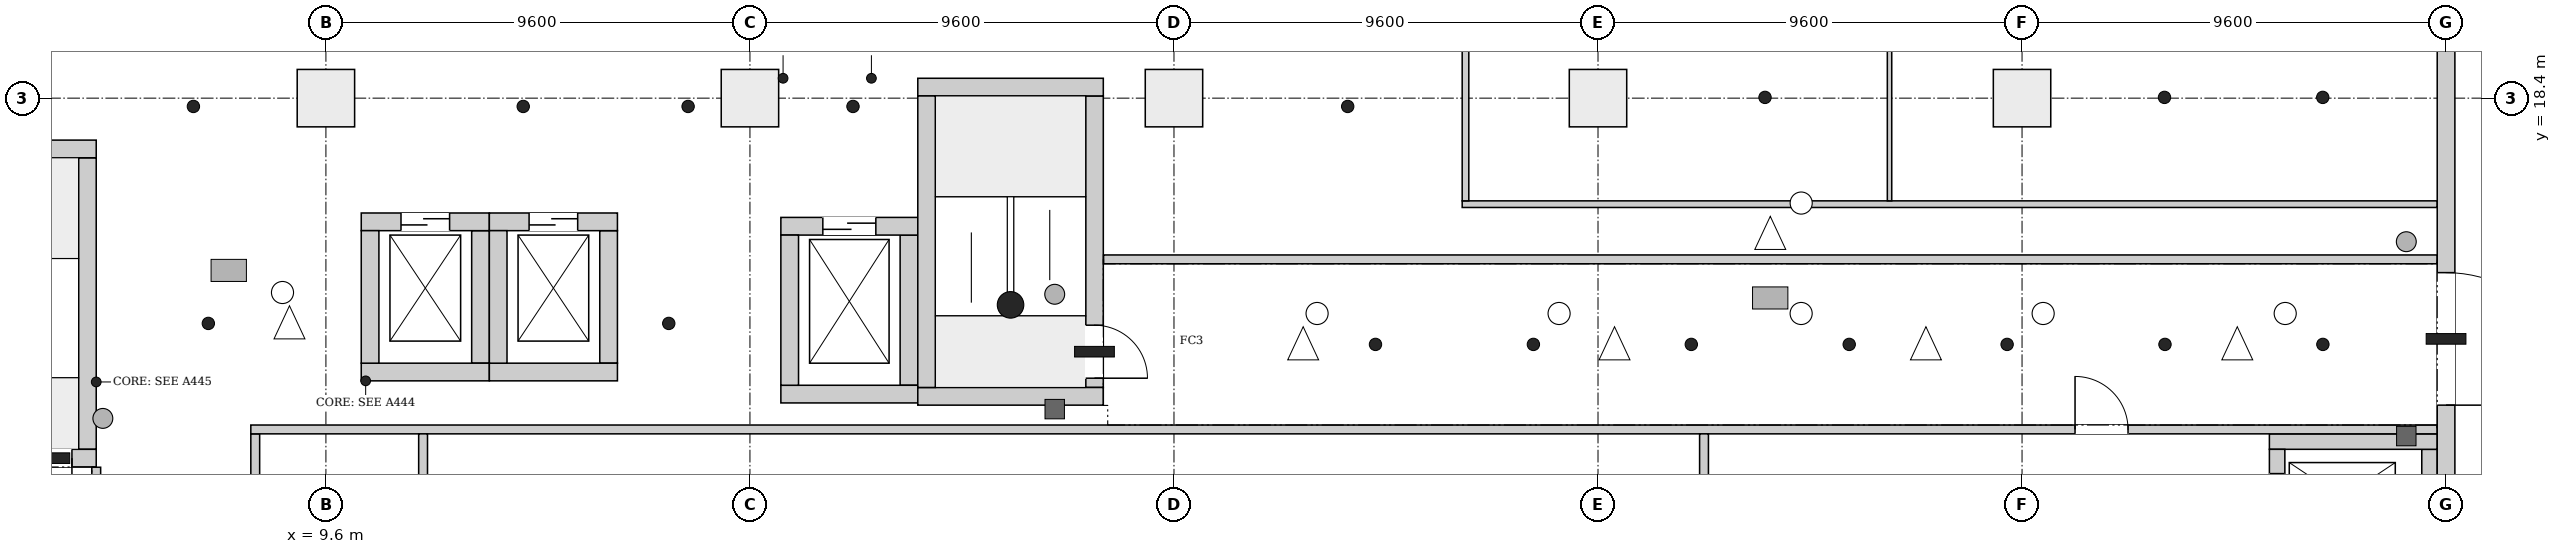
"""IFC4 building model, lengths in metres.
Left out: names, types, materials, properties, quantities, classifications, styles, units other than length and angle.
Written with IfcOpenShell. Run it as: python <this file> out.ifc"""

import sys

from ifc_helpers import new_model, si_unit, direction, frame, frame_2d, origin, origin_2d, place, context, subcontext, project, spatial, rectangle, extrude, element, fill, save


model = new_model("IFC4")
c1 = context("Model", 3, precision=1e-05, world=origin(), true_north=direction((0.0, 1.0)))
c2 = subcontext(c1, "Body", "Model", "MODEL_VIEW")
j1 = project(units=[si_unit("LENGTHUNIT", "METRE"), si_unit("PLANEANGLEUNIT", "RADIAN")], contexts=[c1])
p1 = place(None, origin())
s1 = spatial("IfcSite", under=j1, at=p1, CompositionType="ELEMENT")
p2 = place(p1, origin())
s2 = spatial("IfcBuilding", under=s1, at=p2, CompositionType="ELEMENT")
p3 = place(p2, origin())
s3 = spatial("IfcBuildingStorey", under=s2, at=p3, CompositionType="ELEMENT", Elevation=0.0)
p4 = place(p3, frame((57.6, -0.2, 0.0), z_axis=(0.0, 0.0, 1.0), x_axis=(0.0, 1.0, 0.0)))
e1 = element("IfcWall", 1, at=p4, inside=s3, PredefinedType="SHEAR", context=c2, shape_type="SweptSolid", body=[
    extrude(rectangle(XDim=46.88, YDim=0.4, at=frame_2d((23.44, 0.0))), origin(), (0.0, 0.0, 1.0), 6.5),
])
p5 = place(p4, frame((11.65, 0.0, 0.0)))
e2 = element("IfcOpeningElement", 2, at=p5, cuts=e1, PredefinedType="OPENING", context=c2, shape_type="SweptSolid", body=[
    extrude(rectangle(XDim=3.0, YDim=2.4, at=frame_2d((1.5, 1.2))), frame((0.0, 0.21, 0.0), z_axis=(0.0, -1.0, 0.0), x_axis=(1.0, 0.0, 0.0)), (0.0, 0.0, 1.0), 0.42),
])
p6 = place(p4, frame((38.2, 0.0, 0.0)))
e3 = element("IfcOpeningElement", 3, at=p6, cuts=e1, PredefinedType="OPENING", context=c2, shape_type="SweptSolid", body=[
    extrude(rectangle(XDim=3.0, YDim=2.4, at=frame_2d((1.5, 1.2))), frame((0.0, 0.21, 0.0), z_axis=(0.0, -1.0, 0.0), x_axis=(1.0, 0.0, 0.0)), (0.0, 0.0, 1.0), 0.42),
])
p7 = place(p3, frame((0.2, 10.25, 0.0), z_axis=(0.0, 0.0, 1.0), x_axis=(1.0, 0.0, 0.0)))
e4 = element("IfcWall", 4, at=p7, inside=s3, PredefinedType="SHEAR", context=c2, shape_type="SweptSolid", body=[
    extrude(rectangle(XDim=4.2, YDim=0.4, at=frame_2d((2.1, 0.0))), origin(), (0.0, 0.0, 1.0), 6.5),
])
p8 = place(p7, frame((0.55, 0.0, 0.0)))
e5 = element("IfcOpeningElement", 5, at=p8, cuts=e4, PredefinedType="OPENING", context=c2, shape_type="SweptSolid", body=[
    extrude(rectangle(XDim=1.0, YDim=2.1, at=frame_2d((0.5, 1.05))), frame((0.0, 0.21, 0.0), z_axis=(0.0, -1.0, 0.0), x_axis=(1.0, 0.0, 0.0)), (0.0, 0.0, 1.0), 0.42),
])
p9 = place(p7, frame((2.65, 0.0, 0.0)))
e6 = element("IfcOpeningElement", 6, at=p9, cuts=e4, PredefinedType="OPENING", context=c2, shape_type="SweptSolid", body=[
    extrude(rectangle(XDim=1.0, YDim=2.1, at=frame_2d((0.5, 1.05))), frame((0.0, 0.21, 0.0), z_axis=(0.0, -1.0, 0.0), x_axis=(1.0, 0.0, 0.0)), (0.0, 0.0, 1.0), 0.42),
])
p10 = place(p3, frame((0.2, 17.25, 0.0), z_axis=(0.0, 0.0, 1.0), x_axis=(1.0, 0.0, 0.0)))
e7 = element("IfcWall", 7, at=p10, inside=s3, PredefinedType="SHEAR", context=c2, shape_type="SweptSolid", body=[
    extrude(rectangle(XDim=4.2, YDim=0.4, at=frame_2d((2.1, 0.0))), origin(), (0.0, 0.0, 1.0), 6.5),
])
p11 = place(p3, frame((4.2, 10.45, 0.0), z_axis=(0.0, 0.0, 1.0), x_axis=(0.0, 1.0, 0.0)))
e8 = element("IfcWall", 8, at=p11, inside=s3, PredefinedType="SHEAR", context=c2, shape_type="SweptSolid", body=[
    extrude(rectangle(XDim=6.6, YDim=0.4, at=frame_2d((3.3, 0.0))), origin(), (0.0, 0.0, 1.0), 6.5),
])
for number, where, z_axis, x_axis in (
    (9, (23.0, 11.65, 0.0), (0.0, 0.0, 1.0), (1.0, 0.0, 0.0)),
    (10, (23.0, 18.65, 0.0), (0.0, 0.0, 1.0), (1.0, 0.0, 0.0)),
):
    element("IfcWall", number, at=place(p3, frame(where, z_axis=z_axis, x_axis=x_axis)), inside=s3, PredefinedType="SHEAR", context=c2, shape_type="SweptSolid", body=[
        extrude(rectangle(XDim=4.2, YDim=0.4, at=frame_2d((2.1, 0.0))), origin(), (0.0, 0.0, 1.0), 6.5),
    ])
p12 = place(p3, frame((23.2, 11.85, 0.0), z_axis=(0.0, 0.0, 1.0), x_axis=(0.0, 1.0, 0.0)))
e11 = element("IfcWall", 11, at=p12, inside=s3, PredefinedType="SHEAR", context=c2, shape_type="SweptSolid", body=[
    extrude(rectangle(XDim=6.6, YDim=0.4, at=frame_2d((3.3, 0.0))), origin(), (0.0, 0.0, 1.0), 6.5),
])
p13 = place(p3, frame((27.0, 11.85, 0.0), z_axis=(0.0, 0.0, 1.0), x_axis=(0.0, 1.0, 0.0)))
e12 = element("IfcWall", 12, at=p13, inside=s3, PredefinedType="SHEAR", context=c2, shape_type="SweptSolid", body=[
    extrude(rectangle(XDim=6.6, YDim=0.4, at=frame_2d((3.3, 0.0))), origin(), (0.0, 0.0, 1.0), 6.5),
])
p14 = place(p13, frame((0.21, 0.0, 0.0)))
e13 = element("IfcOpeningElement", 13, at=p14, cuts=e12, PredefinedType="OPENING", context=c2, shape_type="SweptSolid", body=[
    extrude(rectangle(XDim=1.2, YDim=2.1, at=frame_2d((0.6, 1.05))), frame((0.0, 0.21, 0.0), z_axis=(0.0, -1.0, 0.0), x_axis=(1.0, 0.0, 0.0)), (0.0, 0.0, 1.0), 0.42),
])
p15 = place(p3, frame((53.6, 10.625, 0.0), z_axis=(0.0, 0.0, 1.0), x_axis=(1.0, 0.0, 0.0)))
e14 = element("IfcWall", 14, at=p15, inside=s3, PredefinedType="SHEAR", context=c2, shape_type="SweptSolid", body=[
    extrude(rectangle(XDim=3.8, YDim=0.35, at=frame_2d((1.9, 0.0))), origin(), (0.0, 0.0, 1.0), 6.5),
])
p16 = place(p3, frame((53.775, 8.25, 0.0), z_axis=(0.0, 0.0, 1.0), x_axis=(0.0, 1.0, 0.0)))
e15 = element("IfcWall", 15, at=p16, inside=s3, PredefinedType="SHEAR", context=c2, shape_type="SweptSolid", body=[
    extrude(rectangle(XDim=2.2, YDim=0.35, at=frame_2d((1.1, 0.0))), origin(), (0.0, 0.0, 1.0), 6.5),
])
p17 = place(p16, frame((0.55, 0.0, 0.0)))
e16 = element("IfcOpeningElement", 16, at=p17, cuts=e15, PredefinedType="OPENING", context=c2, shape_type="SweptSolid", body=[
    extrude(rectangle(XDim=1.1, YDim=2.1, at=frame_2d((0.55, 1.05))), frame((0.0, 0.185, 0.0), z_axis=(0.0, -1.0, 0.0), x_axis=(1.0, 0.0, 0.0)), (0.0, 0.0, 1.0), 0.37),
])
p18 = place(p3, frame((57.225, 8.25, 0.0), z_axis=(0.0, 0.0, 1.0), x_axis=(0.0, 1.0, 0.0)))
e17 = element("IfcWall", 17, at=p18, inside=s3, PredefinedType="SHEAR", context=c2, shape_type="SweptSolid", body=[
    extrude(rectangle(XDim=2.2, YDim=0.35, at=frame_2d((1.1, 0.0))), origin(), (0.0, 0.0, 1.0), 6.5),
])
p19 = place(p3, frame((10.4, 12.2, 0.0), z_axis=(0.0, 0.0, 1.0), x_axis=(1.0, 0.0, 0.0)))
e18 = element("IfcWall", 18, at=p19, inside=s3, PredefinedType="SHEAR", context=c2, shape_type="SweptSolid", body=[
    extrude(rectangle(XDim=2.9, YDim=0.4, at=frame_2d((1.45, 0.0))), origin(), (0.0, 0.0, 1.0), 6.5),
])
p20 = place(p3, frame((10.4, 15.6, 0.0), z_axis=(0.0, 0.0, 1.0), x_axis=(1.0, 0.0, 0.0)))
e19 = element("IfcWall", 19, at=p20, inside=s3, PredefinedType="SHEAR", context=c2, shape_type="SweptSolid", body=[
    extrude(rectangle(XDim=2.9, YDim=0.4, at=frame_2d((1.45, 0.0))), origin(), (0.0, 0.0, 1.0), 6.5),
])
p21 = place(p20, frame((0.9, 0.0, 0.0)))
e20 = element("IfcOpeningElement", 20, at=p21, cuts=e19, PredefinedType="OPENING", context=c2, shape_type="SweptSolid", body=[
    extrude(rectangle(XDim=1.1, YDim=2.1, at=frame_2d((0.55, 1.05))), frame((0.0, 0.21, 0.0), z_axis=(0.0, -1.0, 0.0), x_axis=(1.0, 0.0, 0.0)), (0.0, 0.0, 1.0), 0.42),
])
for number, where, z_axis, x_axis in (
    (21, (10.6, 12.4, 0.0), (0.0, 0.0, 1.0), (0.0, 1.0, 0.0)),
    (22, (13.1, 12.4, 0.0), (0.0, 0.0, 1.0), (0.0, 1.0, 0.0)),
):
    element("IfcWall", number, at=place(p3, frame(where, z_axis=z_axis, x_axis=x_axis)), inside=s3, PredefinedType="SHEAR", context=c2, shape_type="SweptSolid", body=[
        extrude(rectangle(XDim=3.0, YDim=0.4, at=frame_2d((1.5, 0.0))), origin(), (0.0, 0.0, 1.0), 6.5),
    ])
p22 = place(p3, frame((13.3, 12.2, 0.0), z_axis=(0.0, 0.0, 1.0), x_axis=(1.0, 0.0, 0.0)))
e23 = element("IfcWall", 23, at=p22, inside=s3, PredefinedType="SHEAR", context=c2, shape_type="SweptSolid", body=[
    extrude(rectangle(XDim=2.9, YDim=0.4, at=frame_2d((1.45, 0.0))), origin(), (0.0, 0.0, 1.0), 6.5),
])
p23 = place(p3, frame((13.3, 15.6, 0.0), z_axis=(0.0, 0.0, 1.0), x_axis=(1.0, 0.0, 0.0)))
e24 = element("IfcWall", 24, at=p23, inside=s3, PredefinedType="SHEAR", context=c2, shape_type="SweptSolid", body=[
    extrude(rectangle(XDim=2.9, YDim=0.4, at=frame_2d((1.45, 0.0))), origin(), (0.0, 0.0, 1.0), 6.5),
])
p24 = place(p23, frame((0.9, 0.0, 0.0)))
e25 = element("IfcOpeningElement", 25, at=p24, cuts=e24, PredefinedType="OPENING", context=c2, shape_type="SweptSolid", body=[
    extrude(rectangle(XDim=1.1, YDim=2.1, at=frame_2d((0.55, 1.05))), frame((0.0, 0.21, 0.0), z_axis=(0.0, -1.0, 0.0), x_axis=(1.0, 0.0, 0.0)), (0.0, 0.0, 1.0), 0.42),
])
for number, where, z_axis, x_axis in (
    (26, (13.5, 12.4, 0.0), (0.0, 0.0, 1.0), (0.0, 1.0, 0.0)),
    (27, (16.0, 12.4, 0.0), (0.0, 0.0, 1.0), (0.0, 1.0, 0.0)),
):
    element("IfcWall", number, at=place(p3, frame(where, z_axis=z_axis, x_axis=x_axis)), inside=s3, PredefinedType="SHEAR", context=c2, shape_type="SweptSolid", body=[
        extrude(rectangle(XDim=3.0, YDim=0.4, at=frame_2d((1.5, 0.0))), origin(), (0.0, 0.0, 1.0), 6.5),
    ])
p25 = place(p3, frame((19.9, 11.7, 0.0), z_axis=(0.0, 0.0, 1.0), x_axis=(1.0, 0.0, 0.0)))
e28 = element("IfcWall", 28, at=p25, inside=s3, PredefinedType="SHEAR", context=c2, shape_type="SweptSolid", body=[
    extrude(rectangle(XDim=3.1, YDim=0.4, at=frame_2d((1.55, 0.0))), origin(), (0.0, 0.0, 1.0), 6.5),
])
p26 = place(p3, frame((19.9, 15.5, 0.0), z_axis=(0.0, 0.0, 1.0), x_axis=(1.0, 0.0, 0.0)))
e29 = element("IfcWall", 29, at=p26, inside=s3, PredefinedType="SHEAR", context=c2, shape_type="SweptSolid", body=[
    extrude(rectangle(XDim=3.1, YDim=0.4, at=frame_2d((1.55, 0.0))), origin(), (0.0, 0.0, 1.0), 6.5),
])
p27 = place(p26, frame((0.95, 0.0, 0.0)))
e30 = element("IfcOpeningElement", 30, at=p27, cuts=e29, PredefinedType="OPENING", context=c2, shape_type="SweptSolid", body=[
    extrude(rectangle(XDim=1.2, YDim=2.1, at=frame_2d((0.6, 1.05))), frame((0.0, 0.21, 0.0), z_axis=(0.0, -1.0, 0.0), x_axis=(1.0, 0.0, 0.0)), (0.0, 0.0, 1.0), 0.42),
])
for number, where, z_axis, x_axis in (
    (31, (20.1, 11.9, 0.0), (0.0, 0.0, 1.0), (0.0, 1.0, 0.0)),
    (32, (22.8, 11.9, 0.0), (0.0, 0.0, 1.0), (0.0, 1.0, 0.0)),
):
    element("IfcWall", number, at=place(p3, frame(where, z_axis=z_axis, x_axis=x_axis)), inside=s3, PredefinedType="SHEAR", context=c2, shape_type="SweptSolid", body=[
        extrude(rectangle(XDim=3.4, YDim=0.4, at=frame_2d((1.7, 0.0))), origin(), (0.0, 0.0, 1.0), 6.5),
    ])
for number, where, z_axis, x_axis in (
    (33, (9.6, 18.4, 0.0), (0.0, 0.0, 1.0), (1.0, 0.0, 0.0)),
    (34, (19.2, 18.4, 0.0), (0.0, 0.0, 1.0), (1.0, 0.0, 0.0)),
    (35, (28.8, 18.4, 0.0), (0.0, 0.0, 1.0), (1.0, 0.0, 0.0)),
    (36, (38.4, 18.4, 0.0), (0.0, 0.0, 1.0), (1.0, 0.0, 0.0)),
    (37, (48.0, 18.4, 0.0), (0.0, 0.0, 1.0), (1.0, 0.0, 0.0)),
):
    element("IfcColumn", number, at=place(p3, frame(where, z_axis=z_axis, x_axis=x_axis)), inside=s3, PredefinedType="COLUMN", context=c2, shape_type="SweptSolid", body=[
        extrude(rectangle(XDim=1.3, YDim=1.3, at=origin_2d()), origin(), (0.0, 0.0, 1.0), 6.5),
    ])
p28 = place(p3, frame((4.4, 6.6, 0.0), z_axis=(0.0, 0.0, 1.0), x_axis=(0.0, 1.0, 0.0)))
e38 = element("IfcWall", 38, at=p28, inside=s3, PredefinedType="PARTITIONING", context=c2, shape_type="SweptSolid", body=[
    extrude(rectangle(XDim=3.444, YDim=0.2, at=frame_2d((1.722, 0.0))), origin(), (0.0, 0.0, 1.0), 6.15),
])
p29 = place(p28, frame((1.222, 0.0, 0.0)))
e39 = element("IfcOpeningElement", 39, at=p29, cuts=e38, PredefinedType="OPENING", context=c2, shape_type="SweptSolid", body=[
    extrude(rectangle(XDim=1.0, YDim=2.1, at=frame_2d((0.5, 1.05))), frame((0.0, 0.11, 0.0), z_axis=(0.0, -1.0, 0.0), x_axis=(1.0, 0.0, 0.0)), (0.0, 0.0, 1.0), 0.22),
])
p30 = place(p3, frame((8.0, 0.206, 0.0), z_axis=(0.0, 0.0, 1.0), x_axis=(0.0, 1.0, 0.0)))
e40 = element("IfcWall", 40, at=p30, inside=s3, PredefinedType="PARTITIONING", context=c2, shape_type="SweptSolid", body=[
    extrude(rectangle(XDim=10.594, YDim=0.2, at=frame_2d((5.297, 0.0))), origin(), (0.0, 0.0, 1.0), 6.15),
])
p31 = place(p30, frame((4.697, 0.0, 0.0)))
e41 = element("IfcOpeningElement", 41, at=p31, cuts=e40, PredefinedType="OPENING", context=c2, shape_type="SweptSolid", body=[
    extrude(rectangle(XDim=1.2, YDim=2.1, at=frame_2d((0.6, 1.05))), frame((0.0, 0.11, 0.0), z_axis=(0.0, -1.0, 0.0), x_axis=(1.0, 0.0, 0.0)), (0.0, 0.0, 1.0), 0.22),
])
p32 = place(p3, frame((7.9, 10.9, 0.0), z_axis=(0.0, 0.0, 1.0), x_axis=(1.0, 0.0, 0.0)))
e42 = element("IfcWall", 42, at=p32, inside=s3, PredefinedType="PARTITIONING", context=c2, shape_type="SweptSolid", body=[
    extrude(rectangle(XDim=49.494, YDim=0.2, at=frame_2d((24.747, 0.0))), origin(), (0.0, 0.0, 1.0), 6.15),
])
p33 = place(p32, frame((41.3, 0.0, 0.0)))
e43 = element("IfcOpeningElement", 43, at=p33, cuts=e42, PredefinedType="OPENING", context=c2, shape_type="SweptSolid", body=[
    extrude(rectangle(XDim=1.2, YDim=2.1, at=frame_2d((0.6, 1.05))), frame((0.0, 0.11, 0.0), z_axis=(0.0, -1.0, 0.0), x_axis=(1.0, 0.0, 0.0)), (0.0, 0.0, 1.0), 0.22),
])
p34 = place(p3, frame((11.8, 0.206, 0.0), z_axis=(0.0, 0.0, 1.0), x_axis=(0.0, 1.0, 0.0)))
e44 = element("IfcWall", 44, at=p34, inside=s3, PredefinedType="PARTITIONING", context=c2, shape_type="SweptSolid", body=[
    extrude(rectangle(XDim=10.594, YDim=0.2, at=frame_2d((5.297, 0.0))), origin(), (0.0, 0.0, 1.0), 6.15),
])
p35 = place(p34, frame((4.397, 0.0, 0.0)))
e45 = element("IfcOpeningElement", 45, at=p35, cuts=e44, PredefinedType="OPENING", context=c2, shape_type="SweptSolid", body=[
    extrude(rectangle(XDim=1.8, YDim=2.1, at=frame_2d((0.9, 1.05))), frame((0.0, 0.11, 0.0), z_axis=(0.0, -1.0, 0.0), x_axis=(1.0, 0.0, 0.0)), (0.0, 0.0, 1.0), 0.22),
])
p36 = place(p3, frame((27.206, 14.75, 0.0), z_axis=(0.0, 0.0, 1.0), x_axis=(1.0, 0.0, 0.0)))
e46 = element("IfcWall", 46, at=p36, inside=s3, PredefinedType="PARTITIONING", context=c2, shape_type="SweptSolid", body=[
    extrude(rectangle(XDim=30.188, YDim=0.2, at=frame_2d((15.094, 0.0))), origin(), (0.0, 0.0, 1.0), 6.15),
])
p37 = place(p3, frame((35.325, 16.0, 0.0), z_axis=(0.0, 0.0, 1.0), x_axis=(1.0, 0.0, 0.0)))
e47 = element("IfcWall", 47, at=p37, inside=s3, PredefinedType="PARTITIONING", context=c2, shape_type="SweptSolid", body=[
    extrude(rectangle(XDim=22.069, YDim=0.15, at=frame_2d((11.035, 0.0))), origin(), (0.0, 0.0, 1.0), 6.15),
])
p38 = place(p3, frame((35.4, 16.075, 0.0), z_axis=(0.0, 0.0, 1.0), x_axis=(0.0, 1.0, 0.0)))
e48 = element("IfcWall", 48, at=p38, inside=s3, PredefinedType="PARTITIONING", context=c2, shape_type="SweptSolid", body=[
    extrude(rectangle(XDim=10.85, YDim=0.15, at=frame_2d((5.425, 0.0))), origin(), (0.0, 0.0, 1.0), 6.15),
])
p39 = place(p3, frame((40.8, 0.206, 0.0), z_axis=(0.0, 0.0, 1.0), x_axis=(0.0, 1.0, 0.0)))
e49 = element("IfcWall", 49, at=p39, inside=s3, PredefinedType="PARTITIONING", context=c2, shape_type="SweptSolid", body=[
    extrude(rectangle(XDim=10.594, YDim=0.2, at=frame_2d((5.297, 0.0))), origin(), (0.0, 0.0, 1.0), 6.15),
])
p40 = place(p39, frame((6.894, 0.0, 0.0)))
e50 = element("IfcOpeningElement", 50, at=p40, cuts=e49, PredefinedType="OPENING", context=c2, shape_type="SweptSolid", body=[
    extrude(rectangle(XDim=1.8, YDim=2.1, at=frame_2d((0.9, 1.05))), frame((0.0, 0.11, 0.0), z_axis=(0.0, -1.0, 0.0), x_axis=(1.0, 0.0, 0.0)), (0.0, 0.0, 1.0), 0.22),
])
p41 = place(p3, frame((45.0, 16.075, 0.0), z_axis=(0.0, 0.0, 1.0), x_axis=(0.0, 1.0, 0.0)))
e51 = element("IfcWall", 51, at=p41, inside=s3, PredefinedType="PARTITIONING", context=c2, shape_type="SweptSolid", body=[
    extrude(rectangle(XDim=10.85, YDim=0.1, at=frame_2d((5.425, 0.0))), origin(), (0.0, 0.0, 1.0), 6.15),
])
p42 = place(p5, frame((3.0, 0.0, 0.0), z_axis=(0.0, 0.0, 1.0), x_axis=(-1.0, 0.0, 0.0)))
e52 = element("IfcDoor", 52, at=p42, inside=s3, OperationType="DOUBLE_DOOR_SINGLE_SWING", PredefinedType="DOOR", context=c2, shape_type="SweptSolid", body=[
    extrude(rectangle(XDim=3.0, YDim=2.4, at=frame_2d((1.5, 1.2))), frame((0.0, 0.025, 0.0), z_axis=(0.0, -1.0, 0.0), x_axis=(1.0, 0.0, 0.0)), (0.0, 0.0, 1.0), 0.05),
])
fill(e2, e52)
p43 = place(p9, origin())
e53 = element("IfcDoor", 53, at=p43, inside=s3, OperationType="SINGLE_SWING_RIGHT", PredefinedType="DOOR", context=c2, shape_type="SweptSolid", body=[
    extrude(rectangle(XDim=1.0, YDim=2.1, at=frame_2d((0.5, 1.05))), frame((0.0, 0.025, 0.0), z_axis=(0.0, -1.0, 0.0), x_axis=(1.0, 0.0, 0.0)), (0.0, 0.0, 1.0), 0.05),
])
fill(e6, e53)
p44 = place(p14, origin())
e54 = element("IfcDoor", 54, at=p44, inside=s3, OperationType="SINGLE_SWING_LEFT", PredefinedType="DOOR", context=c2, shape_type="SweptSolid", body=[
    extrude(rectangle(XDim=1.2, YDim=2.1, at=frame_2d((0.6, 1.05))), frame((0.0, 0.025, 0.0), z_axis=(0.0, -1.0, 0.0), x_axis=(1.0, 0.0, 0.0)), (0.0, 0.0, 1.0), 0.05),
])
fill(e13, e54)
p45 = place(p17, origin())
e55 = element("IfcDoor", 55, at=p45, inside=s3, OperationType="DOUBLE_DOOR_SLIDING", PredefinedType="DOOR", context=c2, shape_type="SweptSolid", body=[
    extrude(rectangle(XDim=1.1, YDim=2.1, at=frame_2d((0.55, 1.05))), frame((0.0, 0.025, 0.0), z_axis=(0.0, -1.0, 0.0), x_axis=(1.0, 0.0, 0.0)), (0.0, 0.0, 1.0), 0.05),
])
fill(e16, e55)
p46 = place(p21, origin())
e56 = element("IfcDoor", 56, at=p46, inside=s3, OperationType="DOUBLE_DOOR_SLIDING", PredefinedType="DOOR", context=c2, shape_type="SweptSolid", body=[
    extrude(rectangle(XDim=1.1, YDim=2.1, at=frame_2d((0.55, 1.05))), frame((0.0, 0.025, 0.0), z_axis=(0.0, -1.0, 0.0), x_axis=(1.0, 0.0, 0.0)), (0.0, 0.0, 1.0), 0.05),
])
fill(e20, e56)
p47 = place(p24, origin())
e57 = element("IfcDoor", 57, at=p47, inside=s3, OperationType="DOUBLE_DOOR_SLIDING", PredefinedType="DOOR", context=c2, shape_type="SweptSolid", body=[
    extrude(rectangle(XDim=1.1, YDim=2.1, at=frame_2d((0.55, 1.05))), frame((0.0, 0.025, 0.0), z_axis=(0.0, -1.0, 0.0), x_axis=(1.0, 0.0, 0.0)), (0.0, 0.0, 1.0), 0.05),
])
fill(e25, e57)
p48 = place(p27, origin())
e58 = element("IfcDoor", 58, at=p48, inside=s3, OperationType="DOUBLE_DOOR_SLIDING", PredefinedType="DOOR", context=c2, shape_type="SweptSolid", body=[
    extrude(rectangle(XDim=1.2, YDim=2.1, at=frame_2d((0.6, 1.05))), frame((0.0, 0.025, 0.0), z_axis=(0.0, -1.0, 0.0), x_axis=(1.0, 0.0, 0.0)), (0.0, 0.0, 1.0), 0.05),
])
fill(e30, e58)
p49 = place(p33, origin())
e59 = element("IfcDoor", 59, at=p49, inside=s3, OperationType="SINGLE_SWING_LEFT", PredefinedType="DOOR", context=c2, shape_type="SweptSolid", body=[
    extrude(rectangle(XDim=1.2, YDim=2.1, at=frame_2d((0.6, 1.05))), frame((0.0, 0.025, 0.0), z_axis=(0.0, -1.0, 0.0), x_axis=(1.0, 0.0, 0.0)), (0.0, 0.0, 1.0), 0.05),
])
fill(e43, e59)
save(model, sys.argv[1])
